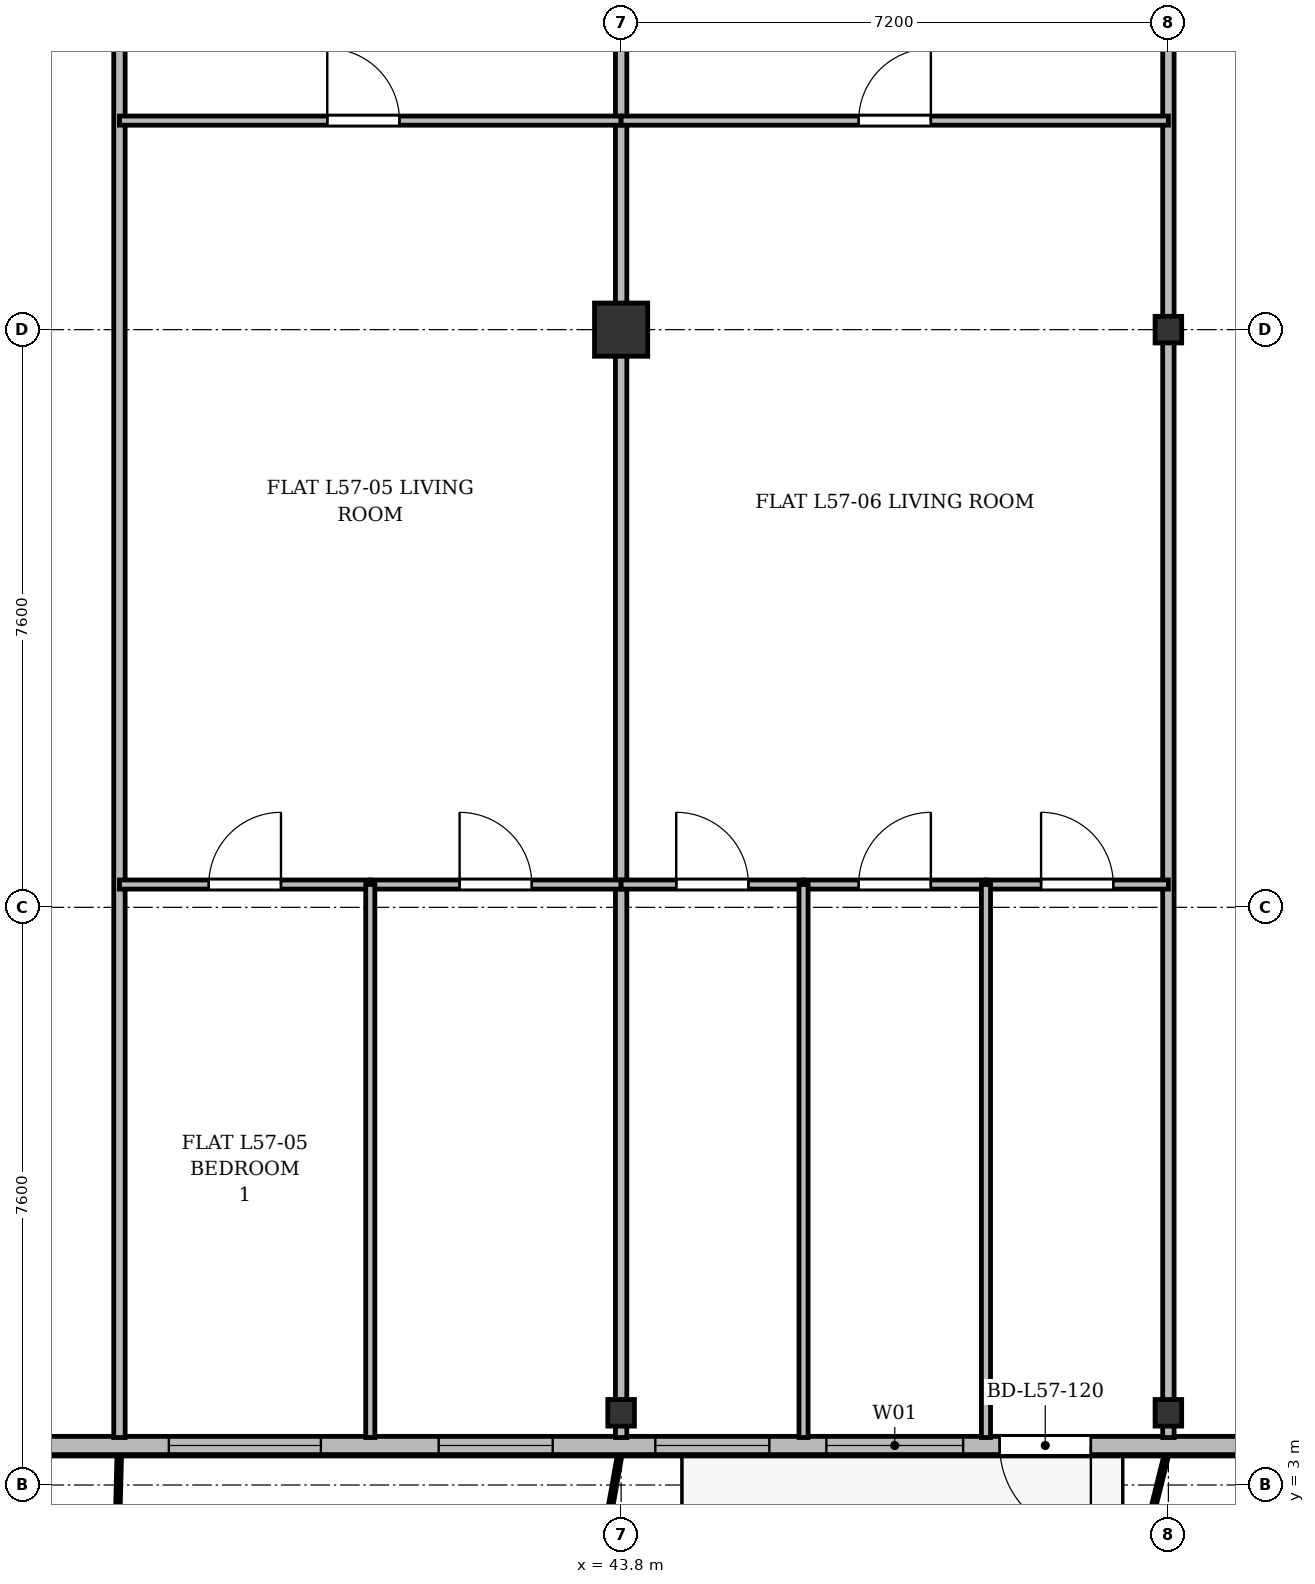
"""IFC4 building model, lengths in metres.
Left out: names, types, materials, properties, quantities, classifications, styles, units other than length and angle.
Written with IfcOpenShell. Run it as: python <this file> out.ifc"""

import sys

from ifc_helpers import new_model, si_unit, direction, frame, frame_2d, origin, origin_2d, place, context, subcontext, project, spatial, rectangle, i_section, extrude, source, transform, mapped, element, fill, save


model = new_model("IFC4")
c1 = context("Model", 3, precision=1e-05, world=origin(), true_north=direction((0.0, 1.0)))
c2 = subcontext(c1, "Body", "Model", "MODEL_VIEW")
j1 = project(units=[si_unit("LENGTHUNIT", "METRE"), si_unit("PLANEANGLEUNIT", "RADIAN")], contexts=[c1])
p1 = place(None, origin())
s1 = spatial("IfcSite", under=j1, at=p1, CompositionType="ELEMENT")
p2 = place(p1, origin())
s2 = spatial("IfcBuilding", under=s1, at=p2, CompositionType="ELEMENT")
p3 = place(p2, frame((0.0, 0.0, 219.3)))
s3 = spatial("IfcBuildingStorey", under=s2, at=p3, CompositionType="ELEMENT", Elevation=219.3)
m1 = source(origin(), c2, "Body", "SweptSolid", [
    extrude(i_section(OverallWidth=0.35, OverallDepth=0.35, WebThickness=0.018, FlangeThickness=0.028, at=origin_2d()), origin(), (0.0, 0.0, 1.0), 3.6),
])
p4 = place(p3, frame((43.8, 3.95, 0.0), z_axis=(0.0, 0.0, 1.0), x_axis=(1.0, 0.0, 0.0)))
e1 = element("IfcColumn", 1, at=p4, inside=s3, PredefinedType="COLUMN", context=c2, shape_type="MappedRepresentation", body=[
    mapped(m1, transform((0.0, 0.0, 0.0), x_axis=(1.0, 0.0, 0.0), y_axis=(0.0, 1.0, 0.0), z_axis=(0.0, 0.0, 1.0), scale=1.0)),
])
m2 = source(origin(), c2, "Body", "SweptSolid", [
    extrude(rectangle(XDim=0.7, YDim=0.7, at=origin_2d()), origin(), (0.0, 0.0, 1.0), 3.6),
])
p5 = place(p3, frame((43.8, 18.2, 0.0), z_axis=(0.0, 0.0, 1.0), x_axis=(1.0, 0.0, 0.0)))
e2 = element("IfcColumn", 2, at=p5, inside=s3, PredefinedType="COLUMN", context=c2, shape_type="MappedRepresentation", body=[
    mapped(m2, transform((0.0, 0.0, 0.0), x_axis=(1.0, 0.0, 0.0), y_axis=(0.0, 1.0, 0.0), z_axis=(0.0, 0.0, 1.0), scale=1.0)),
])
for number, where, z_axis, x_axis in (
    (3, (51.0, 3.95, 0.0), (0.0, 0.0, 1.0), (1.0, 0.0, 0.0)),
    (4, (51.0, 18.2, 0.0), (0.0, 0.0, 1.0), (1.0, 0.0, 0.0)),
):
    element("IfcColumn", number, at=place(p3, frame(where, z_axis=z_axis, x_axis=x_axis)), inside=s3, PredefinedType="COLUMN", context=c2, shape_type="MappedRepresentation", body=[
        mapped(m1, transform((0.0, 0.0, 0.0), x_axis=(1.0, 0.0, 0.0), y_axis=(0.0, 1.0, 0.0), z_axis=(0.0, 0.0, 1.0), scale=1.0)),
    ])
p6 = place(p3, frame((63.4, 3.52, 0.0), z_axis=(0.0, 0.0, 1.0), x_axis=(-1.0, 0.0, 0.0)))
e5 = element("IfcWall", 5, at=p6, inside=s3, PredefinedType="SOLIDWALL", context=c2, shape_type="SweptSolid", body=[
    extrude(rectangle(XDim=52.4, YDim=0.24, at=frame_2d((26.2, 0.0))), origin(), (0.0, 0.0, 1.0), 3.36),
])
p7 = place(p6, frame((1.595, 0.0, 0.9)))
e6 = element("IfcOpeningElement", 6, at=p7, cuts=e5, PredefinedType="OPENING", context=c2, shape_type="SweptSolid", body=[
    extrude(rectangle(XDim=1.5, YDim=1.75, at=frame_2d((0.75, 0.875))), frame((0.0, 0.13, 0.0), z_axis=(0.0, -1.0, 0.0), x_axis=(1.0, 0.0, 0.0)), (0.0, 0.0, 1.0), 0.26),
])
p8 = place(p6, frame((7.5, 0.0, 0.9)))
e7 = element("IfcOpeningElement", 7, at=p8, cuts=e5, PredefinedType="OPENING", context=c2, shape_type="SweptSolid", body=[
    extrude(rectangle(XDim=2.0, YDim=1.95, at=frame_2d((1.0, 0.975))), frame((0.0, 0.13, 0.0), z_axis=(0.0, -1.0, 0.0), x_axis=(1.0, 0.0, 0.0)), (0.0, 0.0, 1.0), 0.26),
])
p9 = place(p6, frame((13.42, 0.0, 0.0)))
e8 = element("IfcOpeningElement", 8, at=p9, cuts=e5, PredefinedType="OPENING", context=c2, shape_type="SweptSolid", body=[
    extrude(rectangle(XDim=1.2, YDim=2.2, at=frame_2d((0.6, 1.1))), frame((0.0, 0.13, 0.0), z_axis=(0.0, -1.0, 0.0), x_axis=(1.0, 0.0, 0.0)), (0.0, 0.0, 1.0), 0.26),
])
p10 = place(p6, frame((15.1, 0.0, 0.9)))
e9 = element("IfcOpeningElement", 9, at=p10, cuts=e5, PredefinedType="OPENING", context=c2, shape_type="SweptSolid", body=[
    extrude(rectangle(XDim=1.8, YDim=1.8, at=frame_2d((0.9, 0.9))), frame((0.0, 0.13, 0.0), z_axis=(0.0, -1.0, 0.0), x_axis=(1.0, 0.0, 0.0)), (0.0, 0.0, 1.0), 0.26),
])
p11 = place(p6, frame((17.65, 0.0, 0.9)))
e10 = element("IfcOpeningElement", 10, at=p11, cuts=e5, PredefinedType="OPENING", context=c2, shape_type="SweptSolid", body=[
    extrude(rectangle(XDim=1.5, YDim=1.75, at=frame_2d((0.75, 0.875))), frame((0.0, 0.13, 0.0), z_axis=(0.0, -1.0, 0.0), x_axis=(1.0, 0.0, 0.0)), (0.0, 0.0, 1.0), 0.26),
])
p12 = place(p6, frame((20.5, 0.0, 0.9)))
e11 = element("IfcOpeningElement", 11, at=p12, cuts=e5, PredefinedType="OPENING", context=c2, shape_type="SweptSolid", body=[
    extrude(rectangle(XDim=1.5, YDim=1.75, at=frame_2d((0.75, 0.875))), frame((0.0, 0.13, 0.0), z_axis=(0.0, -1.0, 0.0), x_axis=(1.0, 0.0, 0.0)), (0.0, 0.0, 1.0), 0.26),
])
p13 = place(p6, frame((23.55, 0.0, 0.9)))
e12 = element("IfcOpeningElement", 12, at=p13, cuts=e5, PredefinedType="OPENING", context=c2, shape_type="SweptSolid", body=[
    extrude(rectangle(XDim=2.0, YDim=1.95, at=frame_2d((1.0, 0.975))), frame((0.0, 0.13, 0.0), z_axis=(0.0, -1.0, 0.0), x_axis=(1.0, 0.0, 0.0)), (0.0, 0.0, 1.0), 0.26),
])
p14 = place(p6, frame((28.675, 0.0, 0.9)))
e13 = element("IfcOpeningElement", 13, at=p14, cuts=e5, PredefinedType="OPENING", context=c2, shape_type="SweptSolid", body=[
    extrude(rectangle(XDim=1.65, YDim=1.85, at=frame_2d((0.825, 0.925))), frame((0.0, 0.13, 0.0), z_axis=(0.0, -1.0, 0.0), x_axis=(1.0, 0.0, 0.0)), (0.0, 0.0, 1.0), 0.26),
])
p15 = place(p6, frame((33.7, 0.0, 0.9)))
e14 = element("IfcOpeningElement", 14, at=p15, cuts=e5, PredefinedType="OPENING", context=c2, shape_type="SweptSolid", body=[
    extrude(rectangle(XDim=1.8, YDim=1.8, at=frame_2d((0.9, 0.9))), frame((0.0, 0.13, 0.0), z_axis=(0.0, -1.0, 0.0), x_axis=(1.0, 0.0, 0.0)), (0.0, 0.0, 1.0), 0.26),
])
p16 = place(p6, frame((37.1, 0.0, 0.9)))
e15 = element("IfcOpeningElement", 15, at=p16, cuts=e5, PredefinedType="OPENING", context=c2, shape_type="SweptSolid", body=[
    extrude(rectangle(XDim=2.2, YDim=1.8, at=frame_2d((1.1, 0.9))), frame((0.0, 0.13, 0.0), z_axis=(0.0, -1.0, 0.0), x_axis=(1.0, 0.0, 0.0)), (0.0, 0.0, 1.0), 0.26),
])
p17 = place(p6, frame((41.09, 0.0, 0.0)))
e16 = element("IfcOpeningElement", 16, at=p17, cuts=e5, PredefinedType="OPENING", context=c2, shape_type="SweptSolid", body=[
    extrude(rectangle(XDim=1.2, YDim=2.2, at=frame_2d((0.6, 1.1))), frame((0.0, 0.13, 0.0), z_axis=(0.0, -1.0, 0.0), x_axis=(1.0, 0.0, 0.0)), (0.0, 0.0, 1.0), 0.26),
])
p18 = place(p6, frame((42.9, 0.0, 0.9)))
e17 = element("IfcOpeningElement", 17, at=p18, cuts=e5, PredefinedType="OPENING", context=c2, shape_type="SweptSolid", body=[
    extrude(rectangle(XDim=2.0, YDim=1.95, at=frame_2d((1.0, 0.975))), frame((0.0, 0.13, 0.0), z_axis=(0.0, -1.0, 0.0), x_axis=(1.0, 0.0, 0.0)), (0.0, 0.0, 1.0), 0.26),
])
p19 = place(p6, frame((45.675, 0.0, 0.9)))
e18 = element("IfcOpeningElement", 18, at=p19, cuts=e5, PredefinedType="OPENING", context=c2, shape_type="SweptSolid", body=[
    extrude(rectangle(XDim=1.65, YDim=1.85, at=frame_2d((0.825, 0.925))), frame((0.0, 0.13, 0.0), z_axis=(0.0, -1.0, 0.0), x_axis=(1.0, 0.0, 0.0)), (0.0, 0.0, 1.0), 0.26),
])
p20 = place(p6, frame((49.155, 0.0, 0.9)))
e19 = element("IfcOpeningElement", 19, at=p20, cuts=e5, PredefinedType="OPENING", context=c2, shape_type="SweptSolid", body=[
    extrude(rectangle(XDim=1.8, YDim=1.8, at=frame_2d((0.9, 0.9))), frame((0.0, 0.13, 0.0), z_axis=(0.0, -1.0, 0.0), x_axis=(1.0, 0.0, 0.0)), (0.0, 0.0, 1.0), 0.26),
])
p21 = place(p3, frame((37.2, 3.625, 0.0), z_axis=(0.0, 0.0, 1.0), x_axis=(0.0, 1.0, 0.0)))
e20 = element("IfcWall", 20, at=p21, inside=s3, PredefinedType="PARTITIONING", context=c2, shape_type="SweptSolid", body=[
    extrude(rectangle(XDim=27.375, YDim=0.15, at=frame_2d((13.688, 0.0))), origin(), (0.0, 0.0, 1.0), 2.91),
])
for number, where, z_axis, x_axis in (
    (21, (43.8, 3.625, 0.0), (0.0, 0.0, 1.0), (0.0, 1.0, 0.0)),
    (22, (51.0, 3.625, 0.0), (0.0, 0.0, 1.0), (0.0, 1.0, 0.0)),
):
    element("IfcWall", number, at=place(p3, frame(where, z_axis=z_axis, x_axis=x_axis)), inside=s3, PredefinedType="PARTITIONING", context=c2, shape_type="SweptSolid", body=[
        extrude(rectangle(XDim=27.375, YDim=0.15, at=frame_2d((13.688, 0.0))), origin(), (0.0, 0.0, 1.0), 2.86),
    ])
p22 = place(p3, frame((37.2, 20.95, 0.0), z_axis=(0.0, 0.0, 1.0), x_axis=(1.0, 0.0, 0.0)))
e23 = element("IfcWall", 23, at=p22, inside=s3, PredefinedType="PARTITIONING", context=c2, shape_type="SweptSolid", body=[
    extrude(rectangle(XDim=6.6, YDim=0.12, at=frame_2d((3.3, 0.0))), origin(), (0.0, 0.0, 1.0), 2.86),
])
p23 = place(p22, frame((2.734, 0.0, 0.0)))
e24 = element("IfcOpeningElement", 24, at=p23, cuts=e23, PredefinedType="OPENING", context=c2, shape_type="SweptSolid", body=[
    extrude(rectangle(XDim=0.95, YDim=2.15, at=frame_2d((0.475, 1.075))), frame((0.0, 0.07, 0.0), z_axis=(0.0, -1.0, 0.0), x_axis=(1.0, 0.0, 0.0)), (0.0, 0.0, 1.0), 0.14),
])
p24 = place(p3, frame((37.2, 10.9, 0.0), z_axis=(0.0, 0.0, 1.0), x_axis=(1.0, 0.0, 0.0)))
e25 = element("IfcWall", 25, at=p24, inside=s3, PredefinedType="PARTITIONING", context=c2, shape_type="SweptSolid", body=[
    extrude(rectangle(XDim=3.3, YDim=0.12, at=frame_2d((1.65, 0.0))), origin(), (0.0, 0.0, 1.0), 3.06),
])
p25 = place(p24, frame((1.175, 0.0, 0.0)))
e26 = element("IfcOpeningElement", 26, at=p25, cuts=e25, PredefinedType="OPENING", context=c2, shape_type="SweptSolid", body=[
    extrude(rectangle(XDim=0.95, YDim=2.15, at=frame_2d((0.475, 1.075))), frame((0.0, 0.07, 0.0), z_axis=(0.0, -1.0, 0.0), x_axis=(1.0, 0.0, 0.0)), (0.0, 0.0, 1.0), 0.14),
])
p26 = place(p3, frame((40.5, 10.9, 0.0), z_axis=(0.0, 0.0, 1.0), x_axis=(1.0, 0.0, 0.0)))
e27 = element("IfcWall", 27, at=p26, inside=s3, PredefinedType="PARTITIONING", context=c2, shape_type="SweptSolid", body=[
    extrude(rectangle(XDim=3.3, YDim=0.12, at=frame_2d((1.65, 0.0))), origin(), (0.0, 0.0, 1.0), 2.86),
])
p27 = place(p26, frame((1.175, 0.0, 0.0)))
e28 = element("IfcOpeningElement", 28, at=p27, cuts=e27, PredefinedType="OPENING", context=c2, shape_type="SweptSolid", body=[
    extrude(rectangle(XDim=0.95, YDim=2.15, at=frame_2d((0.475, 1.075))), frame((0.0, 0.07, 0.0), z_axis=(0.0, -1.0, 0.0), x_axis=(1.0, 0.0, 0.0)), (0.0, 0.0, 1.0), 0.14),
])
p28 = place(p3, frame((40.5, 3.625, 0.0), z_axis=(0.0, 0.0, 1.0), x_axis=(0.0, 1.0, 0.0)))
e29 = element("IfcWall", 29, at=p28, inside=s3, PredefinedType="PARTITIONING", context=c2, shape_type="SweptSolid", body=[
    extrude(rectangle(XDim=7.275, YDim=0.12, at=frame_2d((3.637, 0.0))), origin(), (0.0, 0.0, 1.0), 2.91),
])
p29 = place(p3, frame((43.8, 20.95, 0.0), z_axis=(0.0, 0.0, 1.0), x_axis=(1.0, 0.0, 0.0)))
e30 = element("IfcWall", 30, at=p29, inside=s3, PredefinedType="PARTITIONING", context=c2, shape_type="SweptSolid", body=[
    extrude(rectangle(XDim=7.2, YDim=0.12, at=frame_2d((3.6, 0.0))), origin(), (0.0, 0.0, 1.0), 2.86),
])
p30 = place(p29, frame((3.125, 0.0, 0.0)))
e31 = element("IfcOpeningElement", 31, at=p30, cuts=e30, PredefinedType="OPENING", context=c2, shape_type="SweptSolid", body=[
    extrude(rectangle(XDim=0.95, YDim=2.15, at=frame_2d((0.475, 1.075))), frame((0.0, 0.07, 0.0), z_axis=(0.0, -1.0, 0.0), x_axis=(1.0, 0.0, 0.0)), (0.0, 0.0, 1.0), 0.14),
])
p31 = place(p3, frame((43.8, 10.9, 0.0), z_axis=(0.0, 0.0, 1.0), x_axis=(1.0, 0.0, 0.0)))
e32 = element("IfcWall", 32, at=p31, inside=s3, PredefinedType="PARTITIONING", context=c2, shape_type="SweptSolid", body=[
    extrude(rectangle(XDim=2.4, YDim=0.12, at=frame_2d((1.2, 0.0))), origin(), (0.0, 0.0, 1.0), 2.86),
])
p32 = place(p31, frame((0.725, 0.0, 0.0)))
e33 = element("IfcOpeningElement", 33, at=p32, cuts=e32, PredefinedType="OPENING", context=c2, shape_type="SweptSolid", body=[
    extrude(rectangle(XDim=0.95, YDim=2.15, at=frame_2d((0.475, 1.075))), frame((0.0, 0.07, 0.0), z_axis=(0.0, -1.0, 0.0), x_axis=(1.0, 0.0, 0.0)), (0.0, 0.0, 1.0), 0.14),
])
p33 = place(p3, frame((46.2, 10.9, 0.0), z_axis=(0.0, 0.0, 1.0), x_axis=(1.0, 0.0, 0.0)))
e34 = element("IfcWall", 34, at=p33, inside=s3, PredefinedType="PARTITIONING", context=c2, shape_type="SweptSolid", body=[
    extrude(rectangle(XDim=2.4, YDim=0.12, at=frame_2d((1.2, 0.0))), origin(), (0.0, 0.0, 1.0), 3.06),
])
p34 = place(p33, frame((0.725, 0.0, 0.0)))
e35 = element("IfcOpeningElement", 35, at=p34, cuts=e34, PredefinedType="OPENING", context=c2, shape_type="SweptSolid", body=[
    extrude(rectangle(XDim=0.95, YDim=2.15, at=frame_2d((0.475, 1.075))), frame((0.0, 0.07, 0.0), z_axis=(0.0, -1.0, 0.0), x_axis=(1.0, 0.0, 0.0)), (0.0, 0.0, 1.0), 0.14),
])
p35 = place(p3, frame((46.2, 3.625, 0.0), z_axis=(0.0, 0.0, 1.0), x_axis=(0.0, 1.0, 0.0)))
e36 = element("IfcWall", 36, at=p35, inside=s3, PredefinedType="PARTITIONING", context=c2, shape_type="SweptSolid", body=[
    extrude(rectangle(XDim=7.275, YDim=0.12, at=frame_2d((3.637, 0.0))), origin(), (0.0, 0.0, 1.0), 2.91),
])
p36 = place(p3, frame((48.6, 10.9, 0.0), z_axis=(0.0, 0.0, 1.0), x_axis=(1.0, 0.0, 0.0)))
e37 = element("IfcWall", 37, at=p36, inside=s3, PredefinedType="PARTITIONING", context=c2, shape_type="SweptSolid", body=[
    extrude(rectangle(XDim=2.4, YDim=0.12, at=frame_2d((1.2, 0.0))), origin(), (0.0, 0.0, 1.0), 2.86),
])
p37 = place(p36, frame((0.725, 0.0, 0.0)))
e38 = element("IfcOpeningElement", 38, at=p37, cuts=e37, PredefinedType="OPENING", context=c2, shape_type="SweptSolid", body=[
    extrude(rectangle(XDim=0.95, YDim=2.15, at=frame_2d((0.475, 1.075))), frame((0.0, 0.07, 0.0), z_axis=(0.0, -1.0, 0.0), x_axis=(1.0, 0.0, 0.0)), (0.0, 0.0, 1.0), 0.14),
])
p38 = place(p3, frame((48.6, 3.625, 0.0), z_axis=(0.0, 0.0, 1.0), x_axis=(0.0, 1.0, 0.0)))
e39 = element("IfcWall", 39, at=p38, inside=s3, PredefinedType="PARTITIONING", context=c2, shape_type="SweptSolid", body=[
    extrude(rectangle(XDim=7.275, YDim=0.12, at=frame_2d((3.637, 0.0))), origin(), (0.0, 0.0, 1.0), 2.91),
])
m3 = source(origin(), c2, "Body", "SweptSolid", [
    extrude(rectangle(XDim=1.2, YDim=2.2, at=frame_2d((0.6, 1.1))), frame((0.0, 0.025, 0.0), z_axis=(0.0, -1.0, 0.0), x_axis=(1.0, 0.0, 0.0)), (0.0, 0.0, 1.0), 0.05),
])
p39 = place(p9, origin())
e40 = element("IfcDoor", 40, at=p39, inside=s3, OperationType="SINGLE_SWING_LEFT", PredefinedType="DOOR", context=c2, shape_type="MappedRepresentation", body=[
    mapped(m3, transform((0.0, 0.0, 0.0), x_axis=(1.0, 0.0, 0.0), y_axis=(0.0, 1.0, 0.0), z_axis=(0.0, 0.0, 1.0), scale=1.0)),
])
fill(e8, e40)
m4 = source(origin(), c2, "Body", "SweptSolid", [
    extrude(rectangle(XDim=1.8, YDim=1.8, at=frame_2d((0.9, 0.9))), frame((0.0, 0.03, 0.0), z_axis=(0.0, -1.0, 0.0), x_axis=(1.0, 0.0, 0.0)), (0.0, 0.0, 1.0), 0.06),
])
p40 = place(p10, origin())
e41 = element("IfcWindow", 41, at=p40, inside=s3, PartitioningType="SINGLE_PANEL", PredefinedType="WINDOW", context=c2, shape_type="MappedRepresentation", body=[
    mapped(m4, transform((0.0, 0.0, 0.0), x_axis=(1.0, 0.0, 0.0), y_axis=(0.0, 1.0, 0.0), z_axis=(0.0, 0.0, 1.0), scale=1.0)),
])
fill(e9, e41)
m5 = source(origin(), c2, "Body", "SweptSolid", [
    extrude(rectangle(XDim=1.5, YDim=1.75, at=frame_2d((0.75, 0.875))), frame((0.0, 0.03, 0.0), z_axis=(0.0, -1.0, 0.0), x_axis=(1.0, 0.0, 0.0)), (0.0, 0.0, 1.0), 0.06),
])
p41 = place(p11, origin())
e42 = element("IfcWindow", 42, at=p41, inside=s3, PartitioningType="SINGLE_PANEL", PredefinedType="WINDOW", context=c2, shape_type="MappedRepresentation", body=[
    mapped(m5, transform((0.0, 0.0, 0.0), x_axis=(1.0, 0.0, 0.0), y_axis=(0.0, 1.0, 0.0), z_axis=(0.0, 0.0, 1.0), scale=1.0)),
])
fill(e10, e42)
p42 = place(p12, origin())
e43 = element("IfcWindow", 43, at=p42, inside=s3, PartitioningType="SINGLE_PANEL", PredefinedType="WINDOW", context=c2, shape_type="MappedRepresentation", body=[
    mapped(m5, transform((0.0, 0.0, 0.0), x_axis=(1.0, 0.0, 0.0), y_axis=(0.0, 1.0, 0.0), z_axis=(0.0, 0.0, 1.0), scale=1.0)),
])
fill(e11, e43)
m6 = source(origin(), c2, "Body", "SweptSolid", [
    extrude(rectangle(XDim=2.0, YDim=1.95, at=frame_2d((1.0, 0.975))), frame((0.0, 0.03, 0.0), z_axis=(0.0, -1.0, 0.0), x_axis=(1.0, 0.0, 0.0)), (0.0, 0.0, 1.0), 0.06),
])
p43 = place(p13, origin())
e44 = element("IfcWindow", 44, at=p43, inside=s3, PartitioningType="SINGLE_PANEL", PredefinedType="WINDOW", context=c2, shape_type="MappedRepresentation", body=[
    mapped(m6, transform((0.0, 0.0, 0.0), x_axis=(1.0, 0.0, 0.0), y_axis=(0.0, 1.0, 0.0), z_axis=(0.0, 0.0, 1.0), scale=1.0)),
])
fill(e12, e44)
m7 = source(origin(), c2, "Body", "SweptSolid", [
    extrude(rectangle(XDim=0.95, YDim=2.15, at=frame_2d((0.475, 1.075))), frame((0.0, 0.025, 0.0), z_axis=(0.0, -1.0, 0.0), x_axis=(1.0, 0.0, 0.0)), (0.0, 0.0, 1.0), 0.05),
])
p44 = place(p23, origin())
e45 = element("IfcDoor", 45, at=p44, inside=s3, OperationType="SINGLE_SWING_LEFT", PredefinedType="DOOR", context=c2, shape_type="MappedRepresentation", body=[
    mapped(m7, transform((0.0, 0.0, 0.0), x_axis=(1.0, 0.0, 0.0), y_axis=(0.0, 1.0, 0.0), z_axis=(0.0, 0.0, 1.0), scale=1.0)),
])
fill(e24, e45)
p45 = place(p25, origin())
e46 = element("IfcDoor", 46, at=p45, inside=s3, OperationType="SINGLE_SWING_RIGHT", PredefinedType="DOOR", context=c2, shape_type="MappedRepresentation", body=[
    mapped(m7, transform((0.0, 0.0, 0.0), x_axis=(1.0, 0.0, 0.0), y_axis=(0.0, 1.0, 0.0), z_axis=(0.0, 0.0, 1.0), scale=1.0)),
])
fill(e26, e46)
p46 = place(p27, origin())
e47 = element("IfcDoor", 47, at=p46, inside=s3, OperationType="SINGLE_SWING_LEFT", PredefinedType="DOOR", context=c2, shape_type="MappedRepresentation", body=[
    mapped(m7, transform((0.0, 0.0, 0.0), x_axis=(1.0, 0.0, 0.0), y_axis=(0.0, 1.0, 0.0), z_axis=(0.0, 0.0, 1.0), scale=1.0)),
])
fill(e28, e47)
p47 = place(p30, origin())
e48 = element("IfcDoor", 48, at=p47, inside=s3, OperationType="SINGLE_SWING_RIGHT", PredefinedType="DOOR", context=c2, shape_type="MappedRepresentation", body=[
    mapped(m7, transform((0.0, 0.0, 0.0), x_axis=(1.0, 0.0, 0.0), y_axis=(0.0, 1.0, 0.0), z_axis=(0.0, 0.0, 1.0), scale=1.0)),
])
fill(e31, e48)
p48 = place(p32, origin())
e49 = element("IfcDoor", 49, at=p48, inside=s3, OperationType="SINGLE_SWING_LEFT", PredefinedType="DOOR", context=c2, shape_type="MappedRepresentation", body=[
    mapped(m7, transform((0.0, 0.0, 0.0), x_axis=(1.0, 0.0, 0.0), y_axis=(0.0, 1.0, 0.0), z_axis=(0.0, 0.0, 1.0), scale=1.0)),
])
fill(e33, e49)
p49 = place(p34, origin())
e50 = element("IfcDoor", 50, at=p49, inside=s3, OperationType="SINGLE_SWING_RIGHT", PredefinedType="DOOR", context=c2, shape_type="MappedRepresentation", body=[
    mapped(m7, transform((0.0, 0.0, 0.0), x_axis=(1.0, 0.0, 0.0), y_axis=(0.0, 1.0, 0.0), z_axis=(0.0, 0.0, 1.0), scale=1.0)),
])
fill(e35, e50)
p50 = place(p37, origin())
e51 = element("IfcDoor", 51, at=p50, inside=s3, OperationType="SINGLE_SWING_LEFT", PredefinedType="DOOR", context=c2, shape_type="MappedRepresentation", body=[
    mapped(m7, transform((0.0, 0.0, 0.0), x_axis=(1.0, 0.0, 0.0), y_axis=(0.0, 1.0, 0.0), z_axis=(0.0, 0.0, 1.0), scale=1.0)),
])
fill(e38, e51)
save(model, sys.argv[1])
